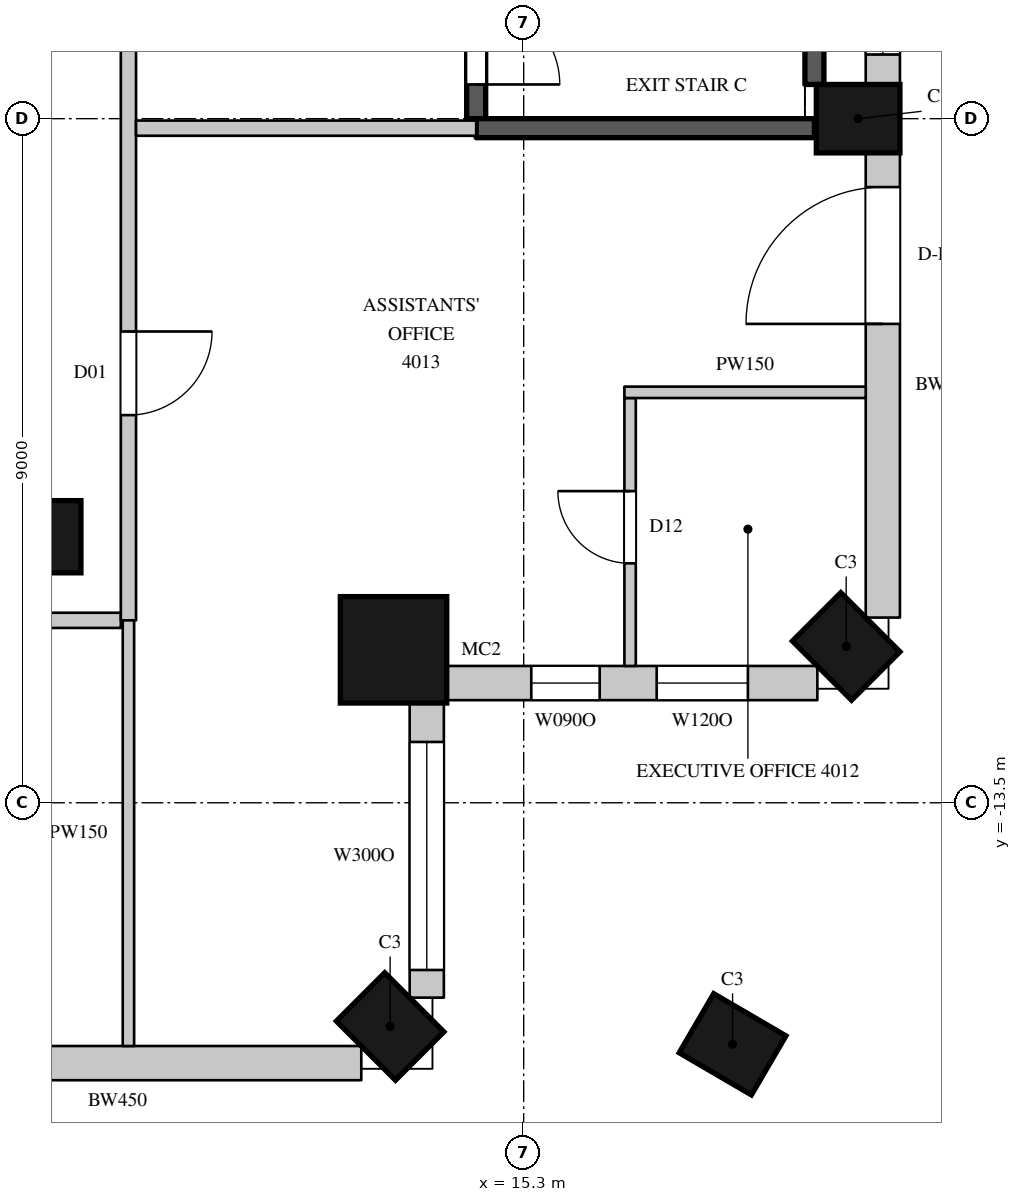
"""IFC4 building model, lengths in metres.
Left out: names, types, materials, properties, quantities, classifications, styles, units other than length and angle.
Written with IfcOpenShell. Run it as: python <this file> out.ifc"""

import sys

from ifc_helpers import new_model, si_unit, direction, frame, frame_2d, origin, origin_2d, place, context, subcontext, project, spatial, rectangle, circle, extrude, element, fill, save


model = new_model("IFC4")
c1 = context("Model", 3, precision=1e-05, world=origin(), true_north=direction((0.0, 1.0)))
c2 = subcontext(c1, "Body", "Model", "MODEL_VIEW")
j1 = project(units=[si_unit("LENGTHUNIT", "METRE"), si_unit("PLANEANGLEUNIT", "RADIAN")], contexts=[c1])
p1 = place(None, origin())
s1 = spatial("IfcSite", under=j1, at=p1, CompositionType="ELEMENT")
p2 = place(p1, origin())
s2 = spatial("IfcBuilding", under=s1, at=p2, CompositionType="ELEMENT")
p3 = place(p2, frame((0.0, 0.0, 185.1)))
s3 = spatial("IfcBuildingStorey", under=s2, at=p3, CompositionType="ELEMENT", Elevation=185.1)
p4 = place(p3, frame((13.543, -16.443, 0.0), z_axis=(0.0, 0.0, 1.0), x_axis=(0.707106781187, 0.707106781187, 0.0)))
e1 = element("IfcColumn", 1, at=p4, inside=s3, PredefinedType="COLUMN", context=c2, shape_type="SweptSolid", body=[
    extrude(rectangle(XDim=0.9, YDim=1.1, at=origin_2d()), origin(), (0.0, 0.0, 1.0), 4.1),
])
p5 = place(p3, frame((13.588, -11.488, 0.0), z_axis=(0.0, 0.0, 1.0), x_axis=(1.0, 0.0, 0.0)))
e2 = element("IfcColumn", 2, at=p5, inside=s3, PredefinedType="COLUMN", context=c2, shape_type="SweptSolid", body=[
    extrude(circle(Radius=0.7, at=origin_2d()), origin(), (0.0, 0.0, 1.0), 4.1),
])
for number, where, z_axis, x_axis in (
    (3, (19.543, -11.443, 0.0), (0.0, 0.0, 1.0), (0.707, 0.707, 0.0)),
    (4, (19.7, -4.5, 0.0), (0.0, 0.0, 1.0), (0.0, 1.0, 0.0)),
    (5, (18.048, -16.677, 0.0), (0.0, 0.0, 1.0), (0.504, 0.863, 0.0)),
):
    element("IfcColumn", number, at=place(p3, frame(where, z_axis=z_axis, x_axis=x_axis)), inside=s3, PredefinedType="COLUMN", context=c2, shape_type="SweptSolid", body=[
        extrude(rectangle(XDim=0.9, YDim=1.1, at=origin_2d()), origin(), (0.0, 0.0, 1.0), 4.1),
    ])
p6 = place(p3, frame((9.0, -10.0, 0.0), z_axis=(0.0, 0.0, 1.0), x_axis=(1.0, 0.0, 0.0)))
e6 = element("IfcColumn", 6, at=p6, inside=s3, PredefinedType="COLUMN", context=c2, shape_type="SweptSolid", body=[
    extrude(circle(Radius=0.475, at=origin_2d()), origin(), (0.0, 0.0, 1.0), 4.1),
])
p7 = place(p3, frame((6.75, -16.925, 0.0), z_axis=(0.0, 0.0, 1.0), x_axis=(1.0, 0.0, 0.0)))
e7 = element("IfcWall", 7, at=p7, inside=s3, PredefinedType="SOLIDWALL", context=c2, shape_type="SweptSolid", body=[
    extrude(rectangle(XDim=6.414, YDim=0.45, at=frame_2d((3.207, 0.0))), origin(), (0.0, 0.0, 1.0), 3.8),
])
p8 = place(p7, frame((0.525, 0.0, 0.0)))
e8 = element("IfcOpeningElement", 8, at=p8, cuts=e7, PredefinedType="OPENING", context=c2, shape_type="SweptSolid", body=[
    extrude(rectangle(XDim=1.8, YDim=2.4, at=frame_2d((0.9, 1.2))), frame((0.0, 0.235, 0.0), z_axis=(0.0, -1.0, 0.0), x_axis=(1.0, 0.0, 0.0)), (0.0, 0.0, 1.0), 0.47),
])
p9 = place(p3, frame((14.025, -16.064, 0.0), z_axis=(0.0, 0.0, 1.0), x_axis=(0.0, 1.0, 0.0)))
e9 = element("IfcWall", 9, at=p9, inside=s3, PredefinedType="SOLIDWALL", context=c2, shape_type="SweptSolid", body=[
    extrude(rectangle(XDim=3.909, YDim=0.45, at=frame_2d((1.955, 0.0))), origin(), (0.0, 0.0, 1.0), 3.8),
])
p10 = place(p9, frame((0.364, 0.0, 1.05)))
e10 = element("IfcOpeningElement", 10, at=p10, cuts=e9, PredefinedType="OPENING", context=c2, shape_type="SweptSolid", body=[
    extrude(rectangle(XDim=3.0, YDim=2.4, at=frame_2d((1.5, 1.2))), frame((0.0, 0.235, 0.0), z_axis=(0.0, -1.0, 0.0), x_axis=(1.0, 0.0, 0.0)), (0.0, 0.0, 1.0), 0.47),
])
p11 = place(p3, frame((14.255, -11.925, 0.0), z_axis=(0.0, 0.0, 1.0), x_axis=(1.0, 0.0, 0.0)))
e11 = element("IfcWall", 11, at=p11, inside=s3, PredefinedType="SOLIDWALL", context=c2, shape_type="SweptSolid", body=[
    extrude(rectangle(XDim=4.909, YDim=0.45, at=frame_2d((2.455, 0.0))), origin(), (0.0, 0.0, 1.0), 3.8),
])
p12 = place(p11, frame((1.146, 0.0, 1.05)))
e12 = element("IfcOpeningElement", 12, at=p12, cuts=e11, PredefinedType="OPENING", context=c2, shape_type="SweptSolid", body=[
    extrude(rectangle(XDim=0.9, YDim=2.4, at=frame_2d((0.45, 1.2))), frame((0.0, 0.235, 0.0), z_axis=(0.0, -1.0, 0.0), x_axis=(1.0, 0.0, 0.0)), (0.0, 0.0, 1.0), 0.47),
])
p13 = place(p11, frame((2.795, 0.0, 1.05)))
e13 = element("IfcOpeningElement", 13, at=p13, cuts=e11, PredefinedType="OPENING", context=c2, shape_type="SweptSolid", body=[
    extrude(rectangle(XDim=1.2, YDim=2.4, at=frame_2d((0.6, 1.2))), frame((0.0, 0.235, 0.0), z_axis=(0.0, -1.0, 0.0), x_axis=(1.0, 0.0, 0.0)), (0.0, 0.0, 1.0), 0.47),
])
p14 = place(p3, frame((20.025, -11.064, 0.0), z_axis=(0.0, 0.0, 1.0), x_axis=(0.0, 1.0, 0.0)))
e14 = element("IfcWall", 14, at=p14, inside=s3, PredefinedType="SOLIDWALL", context=c2, shape_type="SweptSolid", body=[
    extrude(rectangle(XDim=6.114, YDim=0.45, at=frame_2d((3.057, 0.0))), origin(), (0.0, 0.0, 1.0), 3.8),
])
p15 = place(p14, frame((3.864, 0.0, 0.0)))
e15 = element("IfcOpeningElement", 15, at=p15, cuts=e14, PredefinedType="OPENING", context=c2, shape_type="SweptSolid", body=[
    extrude(rectangle(XDim=1.8, YDim=2.4, at=frame_2d((0.9, 1.2))), frame((0.0, 0.235, 0.0), z_axis=(0.0, -1.0, 0.0), x_axis=(1.0, 0.0, 0.0)), (0.0, 0.0, 1.0), 0.47),
])
p16 = place(p3, frame((20.025, -4.05, 0.0), z_axis=(0.0, 0.0, 1.0), x_axis=(0.0, 1.0, 0.0)))
e16 = element("IfcWall", 16, at=p16, inside=s3, PredefinedType="SOLIDWALL", context=c2, shape_type="SweptSolid", body=[
    extrude(rectangle(XDim=8.439, YDim=0.45, at=frame_2d((4.219, 0.0))), origin(), (0.0, 0.0, 1.0), 3.8),
])
p17 = place(p16, frame((0.394, 0.0, 1.05)))
e17 = element("IfcOpeningElement", 17, at=p17, cuts=e16, PredefinedType="OPENING", context=c2, shape_type="SweptSolid", body=[
    extrude(rectangle(XDim=3.0, YDim=2.4, at=frame_2d((1.5, 1.2))), frame((0.0, 0.235, 0.0), z_axis=(0.0, -1.0, 0.0), x_axis=(1.0, 0.0, 0.0)), (0.0, 0.0, 1.0), 0.47),
])
p18 = place(p16, frame((5.082, 0.0, 1.05)))
e18 = element("IfcOpeningElement", 18, at=p18, cuts=e16, PredefinedType="OPENING", context=c2, shape_type="SweptSolid", body=[
    extrude(rectangle(XDim=3.0, YDim=2.4, at=frame_2d((1.5, 1.2))), frame((0.0, 0.235, 0.0), z_axis=(0.0, -1.0, 0.0), x_axis=(1.0, 0.0, 0.0)), (0.0, 0.0, 1.0), 0.47),
])
p19 = place(p3, frame((-10.9, -11.1, 0.0), z_axis=(0.0, 0.0, 1.0), x_axis=(1.0, 0.0, 0.0)))
e19 = element("IfcWall", 19, at=p19, inside=s3, PredefinedType="PARTITIONING", context=c2, shape_type="SweptSolid", body=[
    extrude(rectangle(XDim=20.9, YDim=0.2, at=frame_2d((10.45, 0.0))), origin(), (0.0, 0.0, 1.0), 3.8),
])
p20 = place(p19, frame((1.1, 0.0, 0.0)))
e20 = element("IfcOpeningElement", 20, at=p20, cuts=e19, PredefinedType="OPENING", context=c2, shape_type="SweptSolid", body=[
    extrude(rectangle(XDim=0.9, YDim=2.2, at=frame_2d((0.45, 1.1))), frame((0.0, 0.11, 0.0), z_axis=(0.0, -1.0, 0.0), x_axis=(1.0, 0.0, 0.0)), (0.0, 0.0, 1.0), 0.22),
])
p21 = place(p19, frame((4.9, 0.0, 0.0)))
e21 = element("IfcOpeningElement", 21, at=p21, cuts=e19, PredefinedType="OPENING", context=c2, shape_type="SweptSolid", body=[
    extrude(rectangle(XDim=0.9, YDim=2.2, at=frame_2d((0.45, 1.1))), frame((0.0, 0.11, 0.0), z_axis=(0.0, -1.0, 0.0), x_axis=(1.0, 0.0, 0.0)), (0.0, 0.0, 1.0), 0.22),
])
p22 = place(p19, frame((7.25, 0.0, 0.0)))
e22 = element("IfcOpeningElement", 22, at=p22, cuts=e19, PredefinedType="OPENING", context=c2, shape_type="SweptSolid", body=[
    extrude(rectangle(XDim=0.9, YDim=2.2, at=frame_2d((0.45, 1.1))), frame((0.0, 0.11, 0.0), z_axis=(0.0, -1.0, 0.0), x_axis=(1.0, 0.0, 0.0)), (0.0, 0.0, 1.0), 0.22),
])
p23 = place(p19, frame((9.95, 0.0, 0.0)))
e23 = element("IfcOpeningElement", 23, at=p23, cuts=e19, PredefinedType="OPENING", context=c2, shape_type="SweptSolid", body=[
    extrude(rectangle(XDim=1.1, YDim=2.4, at=frame_2d((0.55, 1.2))), frame((0.0, 0.11, 0.0), z_axis=(0.0, -1.0, 0.0), x_axis=(1.0, 0.0, 0.0)), (0.0, 0.0, 1.0), 0.22),
])
p24 = place(p19, frame((16.3, 0.0, 0.0)))
e24 = element("IfcOpeningElement", 24, at=p24, cuts=e19, PredefinedType="OPENING", context=c2, shape_type="SweptSolid", body=[
    extrude(rectangle(XDim=1.1, YDim=2.4, at=frame_2d((0.55, 1.2))), frame((0.0, 0.11, 0.0), z_axis=(0.0, -1.0, 0.0), x_axis=(1.0, 0.0, 0.0)), (0.0, 0.0, 1.0), 0.22),
])
p25 = place(p3, frame((10.1, -11.1, 0.0), z_axis=(0.0, 0.0, 1.0), x_axis=(0.0, 1.0, 0.0)))
e25 = element("IfcWall", 25, at=p25, inside=s3, PredefinedType="PARTITIONING", context=c2, shape_type="SweptSolid", body=[
    extrude(rectangle(XDim=23.2, YDim=0.2, at=frame_2d((11.6, 0.0))), origin(), (0.0, 0.0, 1.0), 3.8),
])
p26 = place(p25, frame((8.0, 0.0, 0.0)))
e26 = element("IfcOpeningElement", 26, at=p26, cuts=e25, PredefinedType="OPENING", context=c2, shape_type="SweptSolid", body=[
    extrude(rectangle(XDim=1.5, YDim=2.4, at=frame_2d((0.75, 1.2))), frame((0.0, 0.11, 0.0), z_axis=(0.0, -1.0, 0.0), x_axis=(1.0, 0.0, 0.0)), (0.0, 0.0, 1.0), 0.22),
])
p27 = place(p25, frame((18.95, 0.0, 0.0)))
e27 = element("IfcOpeningElement", 27, at=p27, cuts=e25, PredefinedType="OPENING", context=c2, shape_type="SweptSolid", body=[
    extrude(rectangle(XDim=1.1, YDim=2.4, at=frame_2d((0.55, 1.2))), frame((0.0, 0.11, 0.0), z_axis=(0.0, -1.0, 0.0), x_axis=(1.0, 0.0, 0.0)), (0.0, 0.0, 1.0), 0.22),
])
p28 = place(p25, frame((2.7, 0.0, 0.0)))
e28 = element("IfcOpeningElement", 28, at=p28, cuts=e25, PredefinedType="OPENING", context=c2, shape_type="SweptSolid", body=[
    extrude(rectangle(XDim=1.1, YDim=2.4, at=frame_2d((0.55, 1.2))), frame((0.0, 0.11, 0.0), z_axis=(0.0, -1.0, 0.0), x_axis=(1.0, 0.0, 0.0)), (0.0, 0.0, 1.0), 0.22),
])
p29 = place(p3, frame((10.2, -4.625, 0.0), z_axis=(0.0, 0.0, 1.0), x_axis=(1.0, 0.0, 0.0)))
e29 = element("IfcWall", 29, at=p29, inside=s3, PredefinedType="PARTITIONING", context=c2, shape_type="SweptSolid", body=[
    extrude(rectangle(XDim=4.475, YDim=0.2, at=frame_2d((2.238, 0.0))), origin(), (0.0, 0.0, 1.0), 3.8),
])
p30 = place(p3, frame((10.1, -16.7, 0.0), z_axis=(0.0, 0.0, 1.0), x_axis=(0.0, 1.0, 0.0)))
e30 = element("IfcWall", 30, at=p30, inside=s3, PredefinedType="PARTITIONING", context=c2, shape_type="SweptSolid", body=[
    extrude(rectangle(XDim=5.6, YDim=0.15, at=frame_2d((2.8, 0.0))), origin(), (0.0, 0.0, 1.0), 3.8),
])
p31 = place(p3, frame((16.7, -11.7, 0.0), z_axis=(0.0, 0.0, 1.0), x_axis=(0.0, 1.0, 0.0)))
e31 = element("IfcWall", 31, at=p31, inside=s3, PredefinedType="PARTITIONING", context=c2, shape_type="SweptSolid", body=[
    extrude(rectangle(XDim=3.525, YDim=0.15, at=frame_2d((1.762, 0.0))), origin(), (0.0, 0.0, 1.0), 3.8),
])
p32 = place(p31, frame((1.35, 0.0, 0.0)))
e32 = element("IfcOpeningElement", 32, at=p32, cuts=e31, PredefinedType="OPENING", context=c2, shape_type="SweptSolid", body=[
    extrude(rectangle(XDim=0.95, YDim=2.2, at=frame_2d((0.475, 1.1))), frame((0.0, 0.085, 0.0), z_axis=(0.0, -1.0, 0.0), x_axis=(1.0, 0.0, 0.0)), (0.0, 0.0, 1.0), 0.17),
])
p33 = place(p3, frame((16.625, -8.1, 0.0), z_axis=(0.0, 0.0, 1.0), x_axis=(1.0, 0.0, 0.0)))
e33 = element("IfcWall", 33, at=p33, inside=s3, PredefinedType="PARTITIONING", context=c2, shape_type="SweptSolid", body=[
    extrude(rectangle(XDim=3.175, YDim=0.15, at=frame_2d((1.587, 0.0))), origin(), (0.0, 0.0, 1.0), 3.15),
])
p34 = place(p3, frame((14.675, -4.5, 0.0), z_axis=(0.0, 0.0, 1.0), x_axis=(0.0, 1.0, 0.0)))
e34 = element("IfcWall", 34, at=p34, inside=s3, PredefinedType="SHEAR", context=c2, shape_type="SweptSolid", body=[
    extrude(rectangle(XDim=9.0, YDim=0.25, at=frame_2d((4.5, 0.0))), origin(), (0.0, 0.0, 1.0), 3.8),
])
p35 = place(p34, frame((0.45, 0.0, 0.0)))
e35 = element("IfcOpeningElement", 35, at=p35, cuts=e34, PredefinedType="OPENING", context=c2, shape_type="SweptSolid", body=[
    extrude(rectangle(XDim=1.1, YDim=2.2, at=frame_2d((0.55, 1.1))), frame((0.0, 0.135, 0.0), z_axis=(0.0, -1.0, 0.0), x_axis=(1.0, 0.0, 0.0)), (0.0, 0.0, 1.0), 0.27),
])
p36 = place(p3, frame((14.675, -4.625, 0.0), z_axis=(0.0, 0.0, 1.0), x_axis=(1.0, 0.0, 0.0)))
e36 = element("IfcWall", 36, at=p36, inside=s3, PredefinedType="SHEAR", context=c2, shape_type="SweptSolid", body=[
    extrude(rectangle(XDim=4.45, YDim=0.25, at=frame_2d((2.225, 0.0))), origin(), (0.0, 0.0, 1.0), 3.8),
])
p37 = place(p3, frame((19.125, -4.05, 0.0), z_axis=(0.0, 0.0, 1.0), x_axis=(0.0, 1.0, 0.0)))
e37 = element("IfcWall", 37, at=p37, inside=s3, PredefinedType="SHEAR", context=c2, shape_type="SweptSolid", body=[
    extrude(rectangle(XDim=8.477, YDim=0.25, at=frame_2d((4.238, 0.0))), origin(), (0.0, 0.0, 1.0), 3.8),
])
p38 = place(p10, origin())
e38 = element("IfcWindow", 38, at=p38, inside=s3, PartitioningType="SINGLE_PANEL", PredefinedType="WINDOW", context=c2, shape_type="SweptSolid", body=[
    extrude(rectangle(XDim=3.0, YDim=2.4, at=frame_2d((1.5, 1.2))), frame((0.0, 0.135, 0.0), z_axis=(0.0, -1.0, 0.0), x_axis=(1.0, 0.0, 0.0)), (0.0, 0.0, 1.0), 0.06),
])
fill(e10, e38)
p39 = place(p15, origin())
e39 = element("IfcDoor", 39, at=p39, inside=s3, OperationType="SLIDING_TO_LEFT", PredefinedType="DOOR", context=c2, shape_type="SweptSolid", body=[
    extrude(rectangle(XDim=1.8, YDim=2.4, at=frame_2d((0.9, 1.2))), frame((0.0, 0.13, 0.0), z_axis=(0.0, -1.0, 0.0), x_axis=(1.0, 0.0, 0.0)), (0.0, 0.0, 1.0), 0.05),
])
fill(e15, e39)
p40 = place(p17, origin())
e40 = element("IfcWindow", 40, at=p40, inside=s3, PartitioningType="SINGLE_PANEL", PredefinedType="WINDOW", context=c2, shape_type="SweptSolid", body=[
    extrude(rectangle(XDim=3.0, YDim=2.4, at=frame_2d((1.5, 1.2))), frame((0.0, 0.135, 0.0), z_axis=(0.0, -1.0, 0.0), x_axis=(1.0, 0.0, 0.0)), (0.0, 0.0, 1.0), 0.06),
])
fill(e17, e40)
p41 = place(p28, origin())
e41 = element("IfcDoor", 41, at=p41, inside=s3, OperationType="SINGLE_SWING_LEFT", PredefinedType="DOOR", context=c2, shape_type="SweptSolid", body=[
    extrude(rectangle(XDim=1.1, YDim=2.4, at=frame_2d((0.55, 1.2))), frame((0.0, 0.025, 0.0), z_axis=(0.0, -1.0, 0.0), x_axis=(1.0, 0.0, 0.0)), (0.0, 0.0, 1.0), 0.05),
])
fill(e28, e41)
p42 = place(p32, origin())
e42 = element("IfcDoor", 42, at=p42, inside=s3, OperationType="SINGLE_SWING_RIGHT", PredefinedType="DOOR", context=c2, shape_type="SweptSolid", body=[
    extrude(rectangle(XDim=0.95, YDim=2.2, at=frame_2d((0.475, 1.1))), frame((0.0, 0.025, 0.0), z_axis=(0.0, -1.0, 0.0), x_axis=(1.0, 0.0, 0.0)), (0.0, 0.0, 1.0), 0.05),
])
fill(e32, e42)
p43 = place(p35, origin())
e43 = element("IfcDoor", 43, at=p43, inside=s3, OperationType="SINGLE_SWING_RIGHT", PredefinedType="DOOR", context=c2, shape_type="SweptSolid", body=[
    extrude(rectangle(XDim=1.1, YDim=2.2, at=frame_2d((0.55, 1.1))), frame((0.0, 0.025, 0.0), z_axis=(0.0, -1.0, 0.0), x_axis=(1.0, 0.0, 0.0)), (0.0, 0.0, 1.0), 0.05),
])
fill(e35, e43)
p44 = place(p12, origin())
e44 = element("IfcWindow", 44, at=p44, inside=s3, PartitioningType="SINGLE_PANEL", PredefinedType="WINDOW", context=c2, shape_type="SweptSolid", body=[
    extrude(rectangle(XDim=0.9, YDim=2.4, at=frame_2d((0.45, 1.2))), frame((0.0, 0.135, 0.0), z_axis=(0.0, -1.0, 0.0), x_axis=(1.0, 0.0, 0.0)), (0.0, 0.0, 1.0), 0.06),
])
fill(e12, e44)
p45 = place(p13, origin())
e45 = element("IfcWindow", 45, at=p45, inside=s3, PartitioningType="SINGLE_PANEL", PredefinedType="WINDOW", context=c2, shape_type="SweptSolid", body=[
    extrude(rectangle(XDim=1.2, YDim=2.4, at=frame_2d((0.6, 1.2))), frame((0.0, 0.135, 0.0), z_axis=(0.0, -1.0, 0.0), x_axis=(1.0, 0.0, 0.0)), (0.0, 0.0, 1.0), 0.06),
])
fill(e13, e45)
save(model, sys.argv[1])
